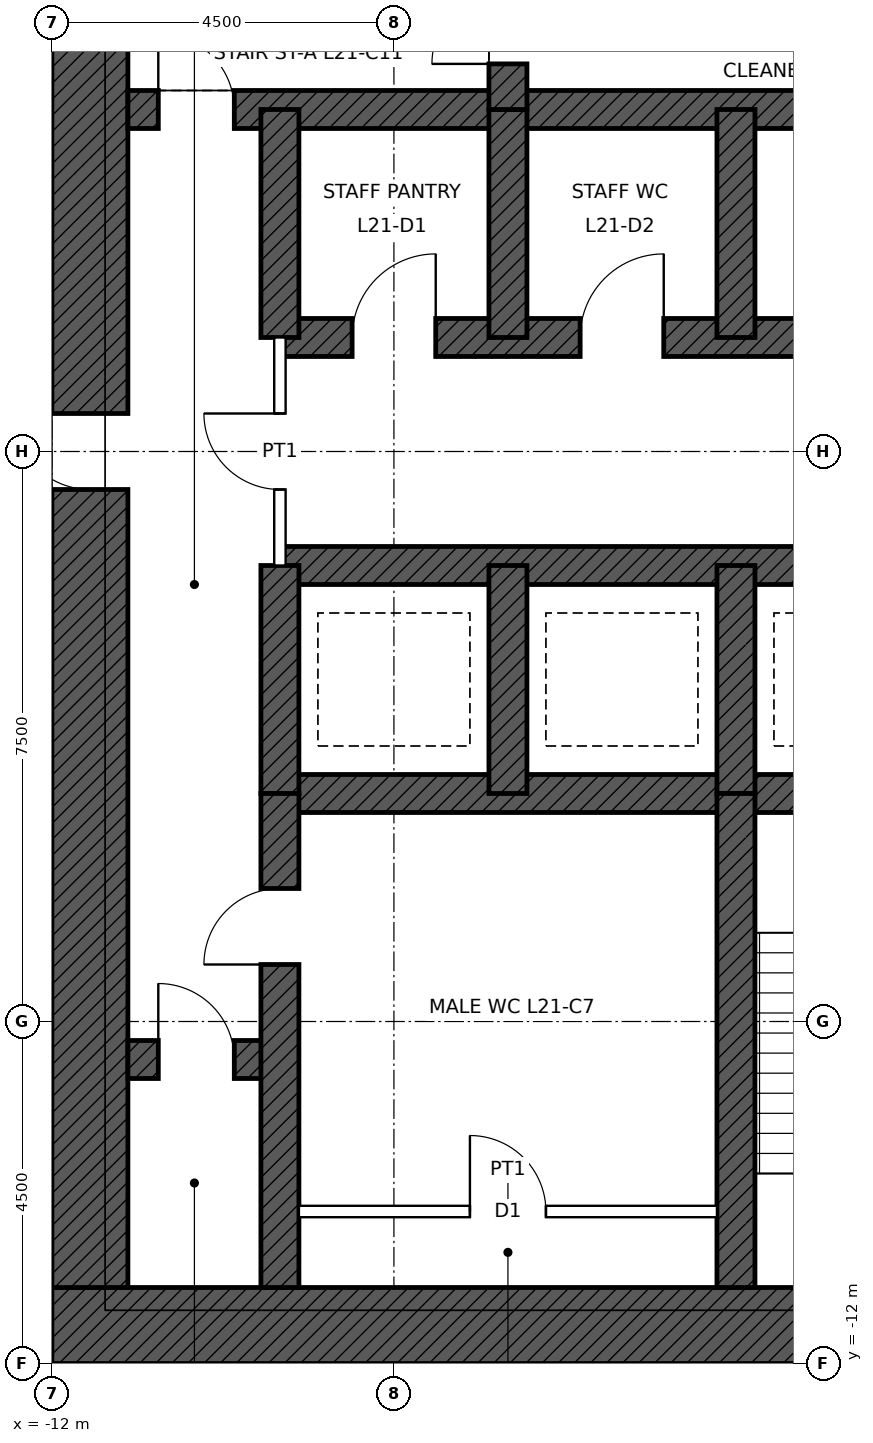
"""IFC4 building model, lengths in metres.
Left out: names, types, materials, properties, quantities, classifications, styles, units other than length and angle.
Written with IfcOpenShell. Run it as: python <this file> out.ifc"""

import sys

from ifc_helpers import new_model, si_unit, direction, frame, frame_2d, origin, place, context, subcontext, project, spatial, rectangle, extrude, element, fill, save


model = new_model("IFC4")
c1 = context("Model", 3, precision=1e-05, world=origin(), true_north=direction((0.0, 1.0)))
c2 = subcontext(c1, "Body", "Model", "MODEL_VIEW")
j1 = project(units=[si_unit("LENGTHUNIT", "METRE"), si_unit("PLANEANGLEUNIT", "RADIAN")], contexts=[c1])
p1 = place(None, origin())
s1 = spatial("IfcSite", under=j1, at=p1, CompositionType="ELEMENT")
p2 = place(p1, origin())
s2 = spatial("IfcBuilding", under=s1, at=p2, CompositionType="ELEMENT")
p3 = place(p2, frame((0.0, 0.0, 108.9)))
s3 = spatial("IfcBuildingStorey", under=s2, at=p3, CompositionType="ELEMENT", Elevation=108.9)
p4 = place(p3, frame((12.0, -11.5, 0.0), z_axis=(0.0, 0.0, 1.0), x_axis=(-1.0, 0.0, 0.0)))
e1 = element("IfcWall", 1, at=p4, inside=s3, PredefinedType="SHEAR", context=c2, shape_type="SweptSolid", body=[
    extrude(rectangle(XDim=24.0, YDim=1.0, at=frame_2d((12.0, 0.0))), origin(), (0.0, 0.0, 1.0), 4.5),
])
p5 = place(p4, frame((11.5, 0.0, 0.0)))
e2 = element("IfcOpeningElement", 2, at=p5, cuts=e1, PredefinedType="OPENING", context=c2, shape_type="SweptSolid", body=[
    extrude(rectangle(XDim=1.0, YDim=2.1, at=frame_2d((0.5, 1.05))), frame((0.0, 0.51, 0.0), z_axis=(0.0, -1.0, 0.0), x_axis=(1.0, 0.0, 0.0)), (0.0, 0.0, 1.0), 1.02),
])
p6 = place(p4, frame((1.0, 0.0, 0.0)))
e3 = element("IfcOpeningElement", 3, at=p6, cuts=e1, PredefinedType="OPENING", context=c2, shape_type="SweptSolid", body=[
    extrude(rectangle(XDim=1.0, YDim=2.4, at=frame_2d((0.5, 1.2))), frame((0.0, 0.51, 0.0), z_axis=(0.0, -1.0, 0.0), x_axis=(1.0, 0.0, 0.0)), (0.0, 0.0, 1.0), 1.02),
])
p7 = place(p3, frame((-11.5, -11.0, 0.0), z_axis=(0.0, 0.0, 1.0), x_axis=(0.0, 1.0, 0.0)))
e4 = element("IfcWall", 4, at=p7, inside=s3, PredefinedType="SHEAR", context=c2, shape_type="SweptSolid", body=[
    extrude(rectangle(XDim=22.0, YDim=1.0, at=frame_2d((11.0, 0.0))), origin(), (0.0, 0.0, 1.0), 4.5),
])
p8 = place(p7, frame((10.5, 0.0, 0.0)))
e5 = element("IfcOpeningElement", 5, at=p8, cuts=e4, PredefinedType="OPENING", context=c2, shape_type="SweptSolid", body=[
    extrude(rectangle(XDim=1.0, YDim=2.4, at=frame_2d((0.5, 1.2))), frame((0.0, 0.51, 0.0), z_axis=(0.0, -1.0, 0.0), x_axis=(1.0, 0.0, 0.0)), (0.0, 0.0, 1.0), 1.02),
])
p9 = place(p3, frame((-11.0, 4.5, 0.0), z_axis=(0.0, 0.0, 1.0), x_axis=(1.0, 0.0, 0.0)))
e6 = element("IfcWall", 6, at=p9, inside=s3, PredefinedType="SHEAR", context=c2, shape_type="SweptSolid", body=[
    extrude(rectangle(XDim=22.0, YDim=0.5, at=frame_2d((11.0, 0.0))), origin(), (0.0, 0.0, 1.0), 4.5),
])
p10 = place(p9, frame((0.4, 0.0, 0.0)))
e7 = element("IfcOpeningElement", 7, at=p10, cuts=e6, PredefinedType="OPENING", context=c2, shape_type="SweptSolid", body=[
    extrude(rectangle(XDim=1.0, YDim=2.1, at=frame_2d((0.5, 1.05))), frame((0.0, 0.26, 0.0), z_axis=(0.0, -1.0, 0.0), x_axis=(1.0, 0.0, 0.0)), (0.0, 0.0, 1.0), 0.52),
])
p11 = place(p9, frame((20.6, 0.0, 0.0)))
e8 = element("IfcOpeningElement", 8, at=p11, cuts=e6, PredefinedType="OPENING", context=c2, shape_type="SweptSolid", body=[
    extrude(rectangle(XDim=1.0, YDim=2.1, at=frame_2d((0.5, 1.05))), frame((0.0, 0.26, 0.0), z_axis=(0.0, -1.0, 0.0), x_axis=(1.0, 0.0, 0.0)), (0.0, 0.0, 1.0), 0.52),
])
p12 = place(p3, frame((-9.0, 1.5, 0.0), z_axis=(0.0, 0.0, 1.0), x_axis=(1.0, 0.0, 0.0)))
e9 = element("IfcWall", 9, at=p12, inside=s3, PredefinedType="SHEAR", context=c2, shape_type="SweptSolid", body=[
    extrude(rectangle(XDim=18.0, YDim=0.5, at=frame_2d((9.0, 0.0))), origin(), (0.0, 0.0, 1.0), 4.5),
])
p13 = place(p12, frame((9.95, 0.0, 0.0)))
e10 = element("IfcOpeningElement", 10, at=p13, cuts=e9, PredefinedType="OPENING", context=c2, shape_type="SweptSolid", body=[
    extrude(rectangle(XDim=1.1, YDim=2.1, at=frame_2d((0.55, 1.05))), frame((0.0, 0.26, 0.0), z_axis=(0.0, -1.0, 0.0), x_axis=(1.0, 0.0, 0.0)), (0.0, 0.0, 1.0), 0.52),
])
p14 = place(p12, frame((12.95, 0.0, 0.0)))
e11 = element("IfcOpeningElement", 11, at=p14, cuts=e9, PredefinedType="OPENING", context=c2, shape_type="SweptSolid", body=[
    extrude(rectangle(XDim=1.1, YDim=2.1, at=frame_2d((0.55, 1.05))), frame((0.0, 0.26, 0.0), z_axis=(0.0, -1.0, 0.0), x_axis=(1.0, 0.0, 0.0)), (0.0, 0.0, 1.0), 0.52),
])
p15 = place(p12, frame((15.95, 0.0, 0.0)))
e12 = element("IfcOpeningElement", 12, at=p15, cuts=e9, PredefinedType="OPENING", context=c2, shape_type="SweptSolid", body=[
    extrude(rectangle(XDim=1.1, YDim=2.1, at=frame_2d((0.55, 1.05))), frame((0.0, 0.26, 0.0), z_axis=(0.0, -1.0, 0.0), x_axis=(1.0, 0.0, 0.0)), (0.0, 0.0, 1.0), 0.52),
])
p16 = place(p12, frame((0.95, 0.0, 0.0)))
e13 = element("IfcOpeningElement", 13, at=p16, cuts=e9, PredefinedType="OPENING", context=c2, shape_type="SweptSolid", body=[
    extrude(rectangle(XDim=1.1, YDim=2.1, at=frame_2d((0.55, 1.05))), frame((0.0, 0.26, 0.0), z_axis=(0.0, -1.0, 0.0), x_axis=(1.0, 0.0, 0.0)), (0.0, 0.0, 1.0), 0.52),
])
p17 = place(p12, frame((3.95, 0.0, 0.0)))
e14 = element("IfcOpeningElement", 14, at=p17, cuts=e9, PredefinedType="OPENING", context=c2, shape_type="SweptSolid", body=[
    extrude(rectangle(XDim=1.1, YDim=2.1, at=frame_2d((0.55, 1.05))), frame((0.0, 0.26, 0.0), z_axis=(0.0, -1.0, 0.0), x_axis=(1.0, 0.0, 0.0)), (0.0, 0.0, 1.0), 0.52),
])
p18 = place(p12, frame((6.95, 0.0, 0.0)))
e15 = element("IfcOpeningElement", 15, at=p18, cuts=e9, PredefinedType="OPENING", context=c2, shape_type="SweptSolid", body=[
    extrude(rectangle(XDim=1.1, YDim=2.1, at=frame_2d((0.55, 1.05))), frame((0.0, 0.26, 0.0), z_axis=(0.0, -1.0, 0.0), x_axis=(1.0, 0.0, 0.0)), (0.0, 0.0, 1.0), 0.52),
])
for number, where, z_axis, x_axis in (
    (16, (-9.0, -1.5, 0.0), (0.0, 0.0, 1.0), (1.0, 0.0, 0.0)),
    (17, (-9.0, -4.5, 0.0), (0.0, 0.0, 1.0), (1.0, 0.0, 0.0)),
):
    element("IfcWall", number, at=place(p3, frame(where, z_axis=z_axis, x_axis=x_axis)), inside=s3, PredefinedType="SHEAR", context=c2, shape_type="SweptSolid", body=[
        extrude(rectangle(XDim=18.0, YDim=0.5, at=frame_2d((9.0, 0.0))), origin(), (0.0, 0.0, 1.0), 4.5),
    ])
p19 = place(p3, frame((-11.0, -8.0, 0.0), z_axis=(0.0, 0.0, 1.0), x_axis=(1.0, 0.0, 0.0)))
e18 = element("IfcWall", 18, at=p19, inside=s3, PredefinedType="SHEAR", context=c2, shape_type="SweptSolid", body=[
    extrude(rectangle(XDim=2.0, YDim=0.5, at=frame_2d((1.0, 0.0))), origin(), (0.0, 0.0, 1.0), 4.5),
])
p20 = place(p19, frame((0.4, 0.0, 0.0)))
e19 = element("IfcOpeningElement", 19, at=p20, cuts=e18, PredefinedType="OPENING", context=c2, shape_type="SweptSolid", body=[
    extrude(rectangle(XDim=1.0, YDim=2.1, at=frame_2d((0.5, 1.05))), frame((0.0, 0.26, 0.0), z_axis=(0.0, -1.0, 0.0), x_axis=(1.0, 0.0, 0.0)), (0.0, 0.0, 1.0), 0.52),
])
for number, where, z_axis, x_axis in (
    (20, (-9.0, 1.5, 0.0), (0.0, 0.0, 1.0), (0.0, 1.0, 0.0)),
    (21, (-9.0, -4.5, 0.0), (0.0, 0.0, 1.0), (0.0, 1.0, 0.0)),
    (22, (-6.0, 1.5, 0.0), (0.0, 0.0, 1.0), (0.0, 1.0, 0.0)),
    (23, (-3.0, 1.5, 0.0), (0.0, 0.0, 1.0), (0.0, 1.0, 0.0)),
    (24, (-6.0, -4.5, 0.0), (0.0, 0.0, 1.0), (0.0, 1.0, 0.0)),
    (25, (-3.0, -4.5, 0.0), (0.0, 0.0, 1.0), (0.0, 1.0, 0.0)),
):
    element("IfcWall", number, at=place(p3, frame(where, z_axis=z_axis, x_axis=x_axis)), inside=s3, PredefinedType="SHEAR", context=c2, shape_type="SweptSolid", body=[
        extrude(rectangle(XDim=3.0, YDim=0.5, at=frame_2d((1.5, 0.0))), origin(), (0.0, 0.0, 1.0), 4.5),
    ])
p21 = place(p3, frame((-6.0, 4.5, 0.0), z_axis=(0.0, 0.0, 1.0), x_axis=(0.0, 1.0, 0.0)))
e26 = element("IfcWall", 26, at=p21, inside=s3, PredefinedType="SHEAR", context=c2, shape_type="SweptSolid", body=[
    extrude(rectangle(XDim=6.5, YDim=0.5, at=frame_2d((3.25, 0.0))), origin(), (0.0, 0.0, 1.0), 4.5),
])
p22 = place(p21, frame((0.6, 0.0, 0.0)))
e27 = element("IfcOpeningElement", 27, at=p22, cuts=e26, PredefinedType="OPENING", context=c2, shape_type="SweptSolid", body=[
    extrude(rectangle(XDim=1.0, YDim=2.1, at=frame_2d((0.5, 1.05))), frame((0.0, 0.26, 0.0), z_axis=(0.0, -1.0, 0.0), x_axis=(1.0, 0.0, 0.0)), (0.0, 0.0, 1.0), 0.52),
])
p23 = place(p3, frame((-9.0, -11.0, 0.0), z_axis=(0.0, 0.0, 1.0), x_axis=(0.0, 1.0, 0.0)))
e28 = element("IfcWall", 28, at=p23, inside=s3, PredefinedType="SHEAR", context=c2, shape_type="SweptSolid", body=[
    extrude(rectangle(XDim=6.5, YDim=0.5, at=frame_2d((3.25, 0.0))), origin(), (0.0, 0.0, 1.0), 4.5),
])
p24 = place(p23, frame((4.25, 0.0, 0.0)))
e29 = element("IfcOpeningElement", 29, at=p24, cuts=e28, PredefinedType="OPENING", context=c2, shape_type="SweptSolid", body=[
    extrude(rectangle(XDim=1.0, YDim=2.1, at=frame_2d((0.5, 1.05))), frame((0.0, 0.26, 0.0), z_axis=(0.0, -1.0, 0.0), x_axis=(1.0, 0.0, 0.0)), (0.0, 0.0, 1.0), 0.52),
])
p25 = place(p3, frame((-3.0, -11.0, 0.0), z_axis=(0.0, 0.0, 1.0), x_axis=(0.0, 1.0, 0.0)))
e30 = element("IfcWall", 30, at=p25, inside=s3, PredefinedType="SHEAR", context=c2, shape_type="SweptSolid", body=[
    extrude(rectangle(XDim=6.5, YDim=0.5, at=frame_2d((3.25, 0.0))), origin(), (0.0, 0.0, 1.0), 4.5),
])
p26 = place(p3, frame((-8.75, -10.0, 0.0), z_axis=(0.0, 0.0, 1.0), x_axis=(1.0, 0.0, 0.0)))
e31 = element("IfcWall", 31, at=p26, inside=s3, PredefinedType="PARTITIONING", context=c2, shape_type="SweptSolid", body=[
    extrude(rectangle(XDim=5.5, YDim=0.15, at=frame_2d((2.75, 0.0))), origin(), (0.0, 0.0, 1.0), 4.25),
])
p27 = place(p26, frame((2.25, 0.0, 0.0)))
e32 = element("IfcOpeningElement", 32, at=p27, cuts=e31, PredefinedType="OPENING", context=c2, shape_type="SweptSolid", body=[
    extrude(rectangle(XDim=1.0, YDim=2.1, at=frame_2d((0.5, 1.05))), frame((0.0, 0.085, 0.0), z_axis=(0.0, -1.0, 0.0), x_axis=(1.0, 0.0, 0.0)), (0.0, 0.0, 1.0), 0.17),
])
p28 = place(p3, frame((-9.0, -1.5, 0.0), z_axis=(0.0, 0.0, 1.0), x_axis=(0.0, 1.0, 0.0)))
e33 = element("IfcWall", 33, at=p28, inside=s3, PredefinedType="PARTITIONING", context=c2, shape_type="SweptSolid", body=[
    extrude(rectangle(XDim=3.0, YDim=0.15, at=frame_2d((1.5, 0.0))), origin(), (0.0, 0.0, 1.0), 4.25),
])
p29 = place(p28, frame((1.0, 0.0, 0.0)))
e34 = element("IfcOpeningElement", 34, at=p29, cuts=e33, PredefinedType="OPENING", context=c2, shape_type="SweptSolid", body=[
    extrude(rectangle(XDim=1.0, YDim=2.4, at=frame_2d((0.5, 1.2))), frame((0.0, 0.085, 0.0), z_axis=(0.0, -1.0, 0.0), x_axis=(1.0, 0.0, 0.0)), (0.0, 0.0, 1.0), 0.17),
])
p30 = place(p10, origin())
e35 = element("IfcDoor", 35, at=p30, inside=s3, OperationType="SINGLE_SWING_LEFT", PredefinedType="DOOR", context=c2, shape_type="SweptSolid", body=[
    extrude(rectangle(XDim=1.0, YDim=2.1, at=frame_2d((0.5, 1.05))), frame((0.0, 0.025, 0.0), z_axis=(0.0, -1.0, 0.0), x_axis=(1.0, 0.0, 0.0)), (0.0, 0.0, 1.0), 0.05),
])
fill(e7, e35)
p31 = place(p22, origin())
e36 = element("IfcDoor", 36, at=p31, inside=s3, OperationType="SINGLE_SWING_LEFT", PredefinedType="DOOR", context=c2, shape_type="SweptSolid", body=[
    extrude(rectangle(XDim=1.0, YDim=2.1, at=frame_2d((0.5, 1.05))), frame((0.0, 0.025, 0.0), z_axis=(0.0, -1.0, 0.0), x_axis=(1.0, 0.0, 0.0)), (0.0, 0.0, 1.0), 0.05),
])
fill(e27, e36)
p32 = place(p8, origin())
e37 = element("IfcDoor", 37, at=p32, inside=s3, OperationType="SINGLE_SWING_RIGHT", PredefinedType="DOOR", context=c2, shape_type="SweptSolid", body=[
    extrude(rectangle(XDim=1.0, YDim=2.4, at=frame_2d((0.5, 1.2))), frame((0.0, 0.485, 0.0), z_axis=(0.0, -1.0, 0.0), x_axis=(1.0, 0.0, 0.0)), (0.0, 0.0, 1.0), 0.05),
])
fill(e5, e37)
p33 = place(p24, origin())
e38 = element("IfcDoor", 38, at=p33, inside=s3, OperationType="SINGLE_SWING_LEFT", PredefinedType="DOOR", context=c2, shape_type="SweptSolid", body=[
    extrude(rectangle(XDim=1.0, YDim=2.1, at=frame_2d((0.5, 1.05))), frame((0.0, 0.025, 0.0), z_axis=(0.0, -1.0, 0.0), x_axis=(1.0, 0.0, 0.0)), (0.0, 0.0, 1.0), 0.05),
])
fill(e29, e38)
p34 = place(p20, origin())
e39 = element("IfcDoor", 39, at=p34, inside=s3, OperationType="SINGLE_SWING_LEFT", PredefinedType="DOOR", context=c2, shape_type="SweptSolid", body=[
    extrude(rectangle(XDim=1.0, YDim=2.1, at=frame_2d((0.5, 1.05))), frame((0.0, 0.025, 0.0), z_axis=(0.0, -1.0, 0.0), x_axis=(1.0, 0.0, 0.0)), (0.0, 0.0, 1.0), 0.05),
])
fill(e19, e39)
p35 = place(p27, origin())
e40 = element("IfcDoor", 40, at=p35, inside=s3, OperationType="SINGLE_SWING_LEFT", PredefinedType="DOOR", context=c2, shape_type="SweptSolid", body=[
    extrude(rectangle(XDim=1.0, YDim=2.1, at=frame_2d((0.5, 1.05))), frame((0.0, 0.025, 0.0), z_axis=(0.0, -1.0, 0.0), x_axis=(1.0, 0.0, 0.0)), (0.0, 0.0, 1.0), 0.05),
])
fill(e32, e40)
p36 = place(p29, origin())
e41 = element("IfcDoor", 41, at=p36, inside=s3, OperationType="SINGLE_SWING_RIGHT", PredefinedType="DOOR", context=c2, shape_type="SweptSolid", body=[
    extrude(rectangle(XDim=1.0, YDim=2.4, at=frame_2d((0.5, 1.2))), frame((0.0, 0.025, 0.0), z_axis=(0.0, -1.0, 0.0), x_axis=(1.0, 0.0, 0.0)), (0.0, 0.0, 1.0), 0.05),
])
fill(e34, e41)
p37 = place(p16, origin())
e42 = element("IfcDoor", 42, at=p37, inside=s3, OperationType="SINGLE_SWING_RIGHT", PredefinedType="DOOR", context=c2, shape_type="SweptSolid", body=[
    extrude(rectangle(XDim=1.1, YDim=2.1, at=frame_2d((0.55, 1.05))), frame((0.0, 0.025, 0.0), z_axis=(0.0, -1.0, 0.0), x_axis=(1.0, 0.0, 0.0)), (0.0, 0.0, 1.0), 0.05),
])
fill(e13, e42)
p38 = place(p17, origin())
e43 = element("IfcDoor", 43, at=p38, inside=s3, OperationType="SINGLE_SWING_RIGHT", PredefinedType="DOOR", context=c2, shape_type="SweptSolid", body=[
    extrude(rectangle(XDim=1.1, YDim=2.1, at=frame_2d((0.55, 1.05))), frame((0.0, 0.025, 0.0), z_axis=(0.0, -1.0, 0.0), x_axis=(1.0, 0.0, 0.0)), (0.0, 0.0, 1.0), 0.05),
])
fill(e14, e43)
save(model, sys.argv[1])
